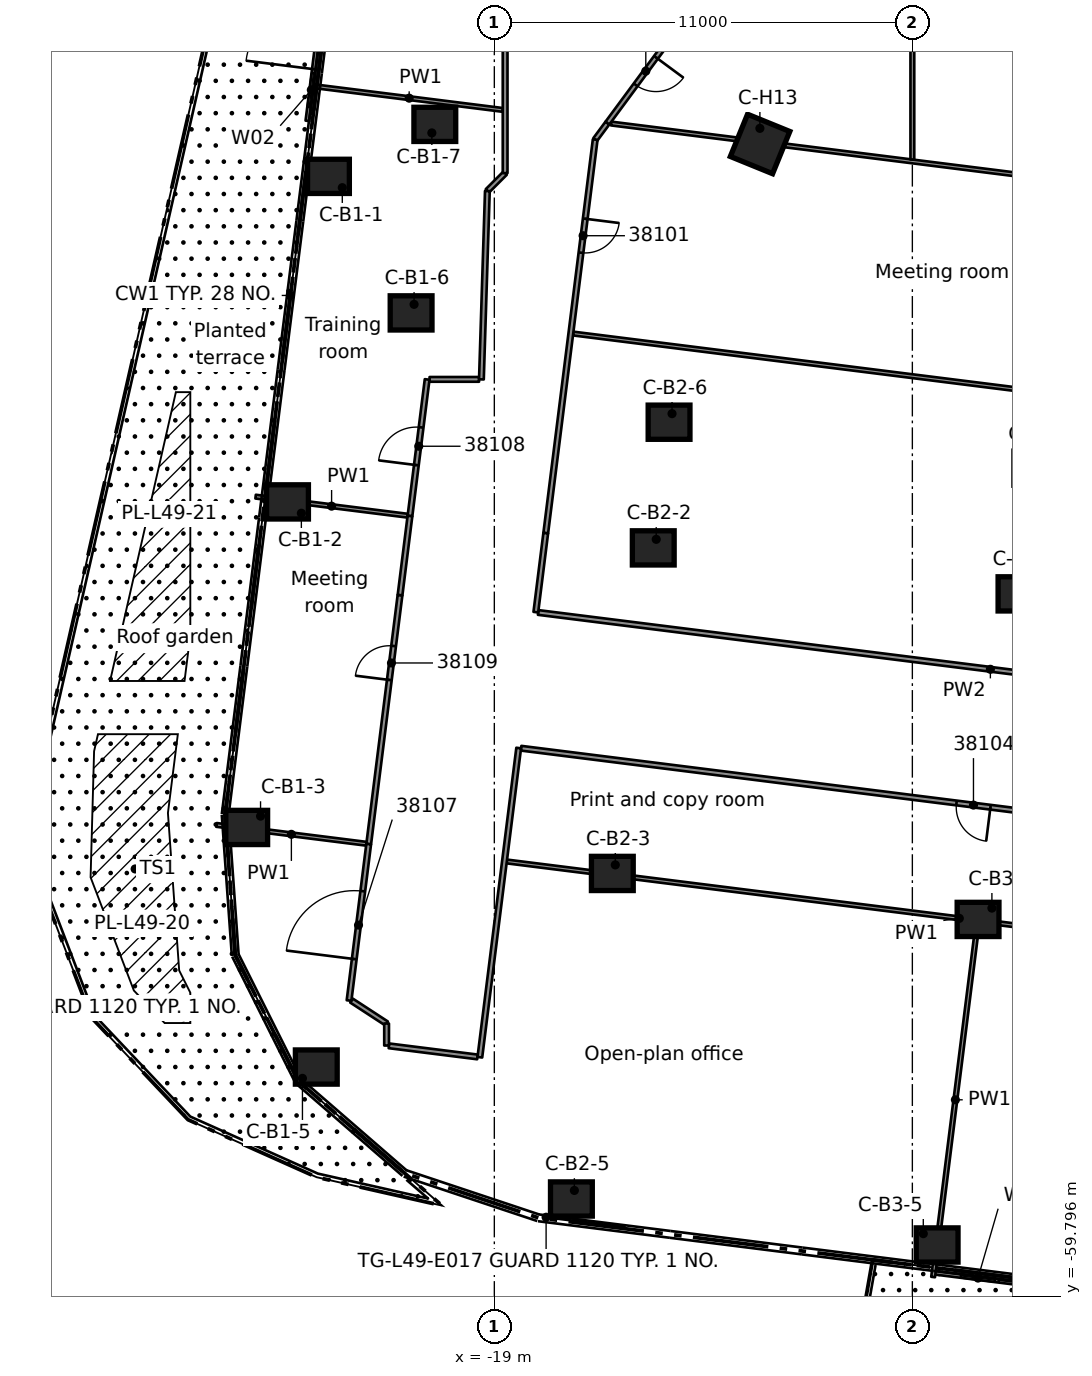
"""IFC4 building model, lengths in metres.
Left out: names, types, materials, properties, quantities, classifications, styles, units other than length and angle.
Written with IfcOpenShell. Run it as: python <this file> out.ifc"""

import sys

from ifc_helpers import new_model, si_unit, direction, frame, frame_2d, origin, origin_2d, place, context, subcontext, project, spatial, rectangle, extrude, element, fill, save


model = new_model("IFC4")
c1 = context("Model", 3, precision=1e-05, world=origin(), true_north=direction((0.0, 1.0)))
c2 = subcontext(c1, "Body", "Model", "MODEL_VIEW")
j1 = project(units=[si_unit("LENGTHUNIT", "METRE"), si_unit("PLANEANGLEUNIT", "RADIAN")], contexts=[c1])
p1 = place(None, origin())
s1 = spatial("IfcSite", under=j1, at=p1, CompositionType="ELEMENT")
p2 = place(p1, origin())
s2 = spatial("IfcBuilding", under=s1, at=p2, CompositionType="ELEMENT")
p3 = place(p2, frame((0.0, 0.0, 188.6)))
s3 = spatial("IfcBuildingStorey", under=s2, at=p3, CompositionType="ELEMENT", Elevation=188.6)
for number, where, z_axis, x_axis in (
    (1, (-23.365, -30.322, 0.0), (0.0, 0.0, 1.0), (1.0, 0.0, 0.0)),
    (2, (-24.442, -38.888, 0.0), (0.0, 0.0, 1.0), (1.0, 0.0, 0.0)),
    (3, (-25.516, -47.454, 0.0), (0.0, 0.0, 1.0), (1.0, 0.0, 0.0)),
    (4, (-23.685, -53.758, 0.0), (0.0, 0.0, 1.0), (1.0, 0.0, 0.0)),
    (5, (-21.19, -33.915, 0.0), (0.0, 0.0, 1.0), (1.0, 0.0, 0.0)),
    (6, (-20.566, -28.954, 0.0), (0.0, 0.0, 1.0), (1.0, 0.0, 0.0)),
    (7, (-14.818, -40.098, 0.0), (0.0, 0.0, 1.0), (1.0, 0.0, 0.0)),
    (8, (-15.895, -48.664, 0.0), (0.0, 0.0, 1.0), (1.0, 0.0, 0.0)),
    (9, (-16.972, -57.23, 0.0), (0.0, 0.0, 1.0), (1.0, 0.0, 0.0)),
    (10, (-14.402, -36.791, 0.0), (0.0, 0.0, 1.0), (1.0, 0.0, 0.0)),
    (11, (-5.194, -41.308, 0.0), (0.0, 0.0, 1.0), (1.0, 0.0, 0.0)),
    (12, (-6.271, -49.874, 0.0), (0.0, 0.0, 1.0), (1.0, 0.0, 0.0)),
    (13, (-7.348, -58.44, 0.0), (0.0, 0.0, 1.0), (1.0, 0.0, 0.0)),
):
    element("IfcColumn", number, at=place(p3, frame(where, z_axis=z_axis, x_axis=x_axis)), inside=s3, PredefinedType="COLUMN", context=c2, shape_type="SweptSolid", body=[
        extrude(rectangle(XDim=1.1, YDim=0.9, at=origin_2d()), origin(), (0.0, 0.0, 1.0), 3.5),
    ])
p4 = place(p3, frame((-12.007, -29.47, 0.0), z_axis=(0.0, 0.0, 1.0), x_axis=(-0.377323624231, -0.926081466501, 0.0)))
e14 = element("IfcColumn", 14, at=p4, inside=s3, PredefinedType="COLUMN", context=c2, shape_type="SweptSolid", body=[
    extrude(rectangle(XDim=1.2, YDim=1.2, at=origin_2d()), origin(), (0.0, 0.0, 1.0), 3.5),
])
p5 = place(p3, frame((-23.918, -28.862, 0.0), z_axis=(0.0, 0.0, 1.0), x_axis=(0.124796053311, 0.992182415223, 0.0)))
e15 = element("IfcWall", 15, at=p5, inside=s3, PredefinedType="STANDARD", context=c2, shape_type="SweptSolid", body=[
    extrude(rectangle(XDim=4.539, YDim=0.1, at=frame_2d((2.269, 0.0))), origin(), (0.0, 0.0, 1.0), 3.08),
])
p6 = place(p5, frame((1.37, 0.0, 0.0)))
e16 = element("IfcOpeningElement", 16, at=p6, cuts=e15, PredefinedType="OPENING", context=c2, shape_type="SweptSolid", body=[
    extrude(rectangle(XDim=1.8, YDim=2.4, at=frame_2d((0.9, 1.2))), frame((0.0, 0.06, 0.0), z_axis=(0.0, -1.0, 0.0), x_axis=(1.0, 0.0, 0.0)), (0.0, 0.0, 1.0), 0.12),
])
p7 = place(p5, frame((0.37, 0.0, 0.0)))
e17 = element("IfcOpeningElement", 17, at=p7, cuts=e15, PredefinedType="OPENING", context=c2, shape_type="SweptSolid", body=[
    extrude(rectangle(XDim=0.9, YDim=2.4, at=frame_2d((0.45, 1.2))), frame((0.0, 0.06, 0.0), z_axis=(0.0, -1.0, 0.0), x_axis=(1.0, 0.0, 0.0)), (0.0, 0.0, 1.0), 0.12),
])
p8 = place(p5, frame((3.27, 0.0, 0.0)))
e18 = element("IfcOpeningElement", 18, at=p8, cuts=e15, PredefinedType="OPENING", context=c2, shape_type="SweptSolid", body=[
    extrude(rectangle(XDim=0.9, YDim=2.4, at=frame_2d((0.45, 1.2))), frame((0.0, 0.06, 0.0), z_axis=(0.0, -1.0, 0.0), x_axis=(1.0, 0.0, 0.0)), (0.0, 0.0, 1.0), 0.12),
])
p9 = place(p3, frame((-2.255, -59.816, 0.0), z_axis=(0.0, 0.0, 1.0), x_axis=(-0.992182235567, 0.124797481646, 0.0)))
e19 = element("IfcWall", 19, at=p9, inside=s3, PredefinedType="STANDARD", context=c2, shape_type="SweptSolid", body=[
    extrude(rectangle(XDim=5.2, YDim=0.1, at=frame_2d((2.6, 0.0))), origin(), (0.0, 0.0, 1.0), 3.08),
])
p10 = place(p9, frame((1.7, 0.0, 0.0)))
e20 = element("IfcOpeningElement", 20, at=p10, cuts=e19, PredefinedType="OPENING", context=c2, shape_type="SweptSolid", body=[
    extrude(rectangle(XDim=1.8, YDim=2.4, at=frame_2d((0.9, 1.2))), frame((0.0, 0.06, 0.0), z_axis=(0.0, -1.0, 0.0), x_axis=(1.0, 0.0, 0.0)), (0.0, 0.0, 1.0), 0.12),
])
p11 = place(p9, frame((0.7, 0.0, 0.0)))
e21 = element("IfcOpeningElement", 21, at=p11, cuts=e19, PredefinedType="OPENING", context=c2, shape_type="SweptSolid", body=[
    extrude(rectangle(XDim=0.9, YDim=2.4, at=frame_2d((0.45, 1.2))), frame((0.0, 0.06, 0.0), z_axis=(0.0, -1.0, 0.0), x_axis=(1.0, 0.0, 0.0)), (0.0, 0.0, 1.0), 0.12),
])
p12 = place(p9, frame((3.6, 0.0, 0.0)))
e22 = element("IfcOpeningElement", 22, at=p12, cuts=e19, PredefinedType="OPENING", context=c2, shape_type="SweptSolid", body=[
    extrude(rectangle(XDim=0.9, YDim=2.4, at=frame_2d((0.45, 1.2))), frame((0.0, 0.06, 0.0), z_axis=(0.0, -1.0, 0.0), x_axis=(1.0, 0.0, 0.0)), (0.0, 0.0, 1.0), 0.12),
])
p13 = place(p3, frame((-21.773, -53.2, 0.0), z_axis=(0.0, 0.0, 1.0), x_axis=(0.992231399055, -0.124405991537, 0.0)))
e23 = element("IfcWall", 23, at=p13, inside=s3, PredefinedType="PARTITIONING", context=c2, shape_type="SweptSolid", body=[
    extrude(rectangle(XDim=2.347, YDim=0.125, at=frame_2d((1.174, 0.0))), origin(), (0.0, 0.0, 1.0), 3.06),
])
p14 = place(p3, frame((-26.313, -47.387, 0.0), z_axis=(0.0, 0.0, 1.0), x_axis=(0.992185976099, -0.124767739553, 0.0)))
e24 = element("IfcWall", 24, at=p14, inside=s3, PredefinedType="PARTITIONING", context=c2, shape_type="SweptSolid", body=[
    extrude(rectangle(XDim=3.976, YDim=0.1, at=frame_2d((1.988, 0.0))), origin(), (0.0, 0.0, 1.0), 3.06),
])
p15 = place(p3, frame((-18.671, -48.349, 0.0), z_axis=(0.0, 0.0, 1.0), x_axis=(0.992194081433, -0.124703266873, 0.0)))
e25 = element("IfcWall", 25, at=p15, inside=s3, PredefinedType="PARTITIONING", context=c2, shape_type="SweptSolid", body=[
    extrude(rectangle(XDim=24.0, YDim=0.1, at=frame_2d((12.0, 0.0))), origin(), (0.0, 0.0, 1.0), 3.06),
])
p16 = place(p3, frame((5.502, -48.361, 0.0), z_axis=(0.0, 0.0, 1.0), x_axis=(-0.992188044587, 0.124751289286, 0.0)))
e26 = element("IfcWall", 26, at=p16, inside=s3, PredefinedType="PARTITIONING", context=c2, shape_type="SweptSolid", body=[
    extrude(rectangle(XDim=23.985, YDim=0.125, at=frame_2d((11.993, 0.0))), origin(), (0.0, 0.0, 1.0), 3.06),
])
p17 = place(p16, frame((11.538, 0.0, 0.0)))
e27 = element("IfcOpeningElement", 27, at=p17, cuts=e26, PredefinedType="OPENING", context=c2, shape_type="SweptSolid", body=[
    extrude(rectangle(XDim=0.9, YDim=2.1, at=frame_2d((0.45, 1.05))), frame((0.0, 0.073, 0.0), z_axis=(0.0, -1.0, 0.0), x_axis=(1.0, 0.0, 0.0)), (0.0, 0.0, 1.0), 0.145),
])
p18 = place(p3, frame((-17.846, -41.797, 0.0), z_axis=(0.0, 0.0, 1.0), x_axis=(0.992194342851, -0.1247011869, 0.0)))
e28 = element("IfcWall", 28, at=p18, inside=s3, PredefinedType="PARTITIONING", context=c2, shape_type="SweptSolid", body=[
    extrude(rectangle(XDim=23.985, YDim=0.125, at=frame_2d((11.993, 0.0))), origin(), (0.0, 0.0, 1.0), 3.06),
])
p19 = place(p18, frame((13.788, 0.0, 0.0)))
e29 = element("IfcOpeningElement", 29, at=p19, cuts=e28, PredefinedType="OPENING", context=c2, shape_type="SweptSolid", body=[
    extrude(rectangle(XDim=1.8, YDim=2.1, at=frame_2d((0.9, 1.05))), frame((0.0, 0.073, 0.0), z_axis=(0.0, -1.0, 0.0), x_axis=(1.0, 0.0, 0.0)), (0.0, 0.0, 1.0), 0.145),
])
p20 = place(p3, frame((-25.282, -38.749, 0.0), z_axis=(0.0, 0.0, 1.0), x_axis=(0.992218133557, -0.124511748205, 0.0)))
e30 = element("IfcWall", 30, at=p20, inside=s3, PredefinedType="PARTITIONING", context=c2, shape_type="SweptSolid", body=[
    extrude(rectangle(XDim=4.031, YDim=0.1, at=frame_2d((2.016, 0.0))), origin(), (0.0, 0.0, 1.0), 3.06),
])
p21 = place(p3, frame((-16.924, -34.458, 0.0), z_axis=(0.0, 0.0, 1.0), x_axis=(0.992190096307, -0.124734970202, 0.0)))
e31 = element("IfcWall", 31, at=p21, inside=s3, PredefinedType="PARTITIONING", context=c2, shape_type="SweptSolid", body=[
    extrude(rectangle(XDim=23.986, YDim=0.1, at=frame_2d((11.993, 0.0))), origin(), (0.0, 0.0, 1.0), 3.06),
])
p22 = place(p3, frame((-23.703, -27.955, 0.0), z_axis=(0.0, 0.0, 1.0), x_axis=(0.992195935575, -0.124688513617, 0.0)))
e32 = element("IfcWall", 32, at=p22, inside=s3, PredefinedType="PARTITIONING", context=c2, shape_type="SweptSolid", body=[
    extrude(rectangle(XDim=4.964, YDim=0.1, at=frame_2d((2.482, 0.0))), origin(), (0.0, 0.0, 1.0), 3.06),
])
p23 = place(p3, frame((-15.925, -28.932, 0.0), z_axis=(0.0, 0.0, 1.0), x_axis=(0.992178923258, -0.124823812799, 0.0)))
e33 = element("IfcWall", 33, at=p23, inside=s3, PredefinedType="PARTITIONING", context=c2, shape_type="SweptSolid", body=[
    extrude(rectangle(XDim=23.57, YDim=0.1, at=frame_2d((11.785, 0.0))), origin(), (0.0, 0.0, 1.0), 3.06),
])
p24 = place(p3, frame((-22.759, -52.009, 0.0), z_axis=(0.0, 0.0, 1.0), x_axis=(0.837456505501, -0.546503981133, 0.0)))
e34 = element("IfcWall", 34, at=p24, inside=s3, PredefinedType="PARTITIONING", context=c2, shape_type="SweptSolid", body=[
    extrude(rectangle(XDim=1.104, YDim=0.125, at=frame_2d((0.552, 0.0))), origin(), (0.0, 0.0, 1.0), 3.06),
])
p25 = place(p3, frame((-20.704, -35.664, 0.0), z_axis=(0.0, 0.0, 1.0), x_axis=(1.0, 0.0, 0.0)))
e35 = element("IfcWall", 35, at=p25, inside=s3, PredefinedType="PARTITIONING", context=c2, shape_type="SweptSolid", body=[
    extrude(rectangle(XDim=1.302, YDim=0.125, at=frame_2d((0.651, 0.0))), origin(), (0.0, 0.0, 1.0), 3.06),
])
p26 = place(p3, frame((-19.182, -30.703, 0.0), z_axis=(0.0, 0.0, 1.0), x_axis=(0.707106781187, 0.707106781187, 0.0)))
e36 = element("IfcWall", 36, at=p26, inside=s3, PredefinedType="PARTITIONING", context=c2, shape_type="SweptSolid", body=[
    extrude(rectangle(XDim=0.659, YDim=0.125, at=frame_2d((0.329, 0.0))), origin(), (0.0, 0.0, 1.0), 3.06),
])
p27 = place(p3, frame((-16.345, -29.354, 0.0), z_axis=(0.0, 0.0, 1.0), x_axis=(0.594632608772, 0.803997550111, 0.0)))
e37 = element("IfcWall", 37, at=p27, inside=s3, PredefinedType="PARTITIONING", context=c2, shape_type="SweptSolid", body=[
    extrude(rectangle(XDim=0.54, YDim=0.125, at=frame_2d((0.27, 0.0))), origin(), (0.0, 0.0, 1.0), 3.06),
])
p28 = place(p3, frame((-14.093, -26.307, 0.0), z_axis=(0.0, 0.0, 1.0), x_axis=(-0.594298094146, -0.80424484785, 0.0)))
e38 = element("IfcWall", 38, at=p28, inside=s3, PredefinedType="PARTITIONING", context=c2, shape_type="SweptSolid", body=[
    extrude(rectangle(XDim=3.249, YDim=0.125, at=frame_2d((1.625, 0.0))), origin(), (0.0, 0.0, 1.0), 3.06),
])
p29 = place(p28, frame((1.1, 0.0, 0.0)))
e39 = element("IfcOpeningElement", 39, at=p29, cuts=e38, PredefinedType="OPENING", context=c2, shape_type="SweptSolid", body=[
    extrude(rectangle(XDim=0.9, YDim=2.1, at=frame_2d((0.45, 1.05))), frame((0.0, 0.073, 0.0), z_axis=(0.0, -1.0, 0.0), x_axis=(1.0, 0.0, 0.0)), (0.0, 0.0, 1.0), 0.145),
])
p30 = place(p3, frame((-19.183, -30.708, 0.0), z_axis=(0.0, 0.0, 1.0), x_axis=(-0.031658999126, -0.99949872825, 0.0)))
e40 = element("IfcWall", 40, at=p30, inside=s3, PredefinedType="PARTITIONING", context=c2, shape_type="SweptSolid", body=[
    extrude(rectangle(XDim=4.958, YDim=0.125, at=frame_2d((2.479, 0.0))), origin(), (0.0, 0.0, 1.0), 3.06),
])
p31 = place(p3, frame((-7.454, -59.283, 0.0), z_axis=(0.0, 0.0, 1.0), x_axis=(0.124805126351, 0.99218127398, 0.0)))
e41 = element("IfcWall", 41, at=p31, inside=s3, PredefinedType="PARTITIONING", context=c2, shape_type="SweptSolid", body=[
    extrude(rectangle(XDim=9.399, YDim=0.1, at=frame_2d((4.7, 0.0))), origin(), (0.0, 0.0, 1.0), 3.06),
])
p32 = place(p3, frame((-19.381, -53.5, 0.0), z_axis=(0.0, 0.0, 1.0), x_axis=(0.124661325918, 0.992199351854, 0.0)))
e42 = element("IfcWall", 42, at=p32, inside=s3, PredefinedType="PARTITIONING", context=c2, shape_type="SweptSolid", body=[
    extrude(rectangle(XDim=8.2, YDim=0.125, at=frame_2d((4.1, 0.0))), origin(), (0.0, 0.0, 1.0), 3.06),
])
p33 = place(p3, frame((-16.346, -29.355, 0.0), z_axis=(0.0, 0.0, 1.0), x_axis=(-0.124673942426, -0.992197766617, 0.0)))
e43 = element("IfcWall", 43, at=p33, inside=s3, PredefinedType="PARTITIONING", context=c2, shape_type="SweptSolid", body=[
    extrude(rectangle(XDim=10.435, YDim=0.125, at=frame_2d((5.218, 0.0))), origin(), (0.0, 0.0, 1.0), 3.06),
])
p34 = place(p33, frame((2.099, 0.0, 0.0)))
e44 = element("IfcOpeningElement", 44, at=p34, cuts=e43, PredefinedType="OPENING", context=c2, shape_type="SweptSolid", body=[
    extrude(rectangle(XDim=0.9, YDim=2.1, at=frame_2d((0.45, 1.05))), frame((0.0, 0.073, 0.0), z_axis=(0.0, -1.0, 0.0), x_axis=(1.0, 0.0, 0.0)), (0.0, 0.0, 1.0), 0.145),
])
p35 = place(p3, frame((-17.908, -41.789, 0.0), z_axis=(0.0, 0.0, 1.0), x_axis=(0.124493385896, 0.992220437639, 0.0)))
e45 = element("IfcWall", 45, at=p35, inside=s3, PredefinedType="PARTITIONING", context=c2, shape_type="SweptSolid", body=[
    extrude(rectangle(XDim=2.096, YDim=0.125, at=frame_2d((1.048, 0.0))), origin(), (0.0, 0.0, 1.0), 3.06),
])
p36 = place(p3, frame((-22.306, -47.891, 0.0), z_axis=(0.0, 0.0, 1.0), x_axis=(0.124831339058, 0.992177976368, 0.0)))
e46 = element("IfcWall", 46, at=p36, inside=s3, PredefinedType="PARTITIONING", context=c2, shape_type="SweptSolid", body=[
    extrude(rectangle(XDim=6.601, YDim=0.125, at=frame_2d((3.3, 0.0))), origin(), (0.0, 0.0, 1.0), 3.06),
])
p37 = place(p36, frame((4.353, 0.0, 0.0)))
e47 = element("IfcOpeningElement", 47, at=p37, cuts=e46, PredefinedType="OPENING", context=c2, shape_type="SweptSolid", body=[
    extrude(rectangle(XDim=0.9, YDim=2.1, at=frame_2d((0.45, 1.05))), frame((0.0, 0.073, 0.0), z_axis=(0.0, -1.0, 0.0), x_axis=(1.0, 0.0, 0.0)), (0.0, 0.0, 1.0), 0.145),
])
p38 = place(p3, frame((-21.22, -39.259, 0.0), z_axis=(0.0, 0.0, 1.0), x_axis=(0.12478977457, 0.992183204939, 0.0)))
e48 = element("IfcWall", 48, at=p38, inside=s3, PredefinedType="PARTITIONING", context=c2, shape_type="SweptSolid", body=[
    extrude(rectangle(XDim=3.621, YDim=0.125, at=frame_2d((1.811, 0.0))), origin(), (0.0, 0.0, 1.0), 3.06),
])
p39 = place(p38, frame((1.35, 0.0, 0.0)))
e49 = element("IfcOpeningElement", 49, at=p39, cuts=e48, PredefinedType="OPENING", context=c2, shape_type="SweptSolid", body=[
    extrude(rectangle(XDim=1.0, YDim=2.1, at=frame_2d((0.5, 1.05))), frame((0.0, 0.073, 0.0), z_axis=(0.0, -1.0, 0.0), x_axis=(1.0, 0.0, 0.0)), (0.0, 0.0, 1.0), 0.145),
])
p40 = place(p3, frame((-22.823, -52.008, 0.0), z_axis=(0.0, 0.0, 1.0), x_axis=(0.12462129386, 0.992204380718, 0.0)))
e50 = element("IfcWall", 50, at=p40, inside=s3, PredefinedType="PARTITIONING", context=c2, shape_type="SweptSolid", body=[
    extrude(rectangle(XDim=4.149, YDim=0.125, at=frame_2d((2.075, 0.0))), origin(), (0.0, 0.0, 1.0), 3.06),
])
p41 = place(p40, frame((1.1, 0.0, 0.0)))
e51 = element("IfcOpeningElement", 51, at=p41, cuts=e50, PredefinedType="OPENING", context=c2, shape_type="SweptSolid", body=[
    extrude(rectangle(XDim=1.8, YDim=2.1, at=frame_2d((0.9, 1.05))), frame((0.0, 0.073, 0.0), z_axis=(0.0, -1.0, 0.0), x_axis=(1.0, 0.0, 0.0)), (0.0, 0.0, 1.0), 0.145),
])
p42 = place(p3, frame((-21.481, -41.34, 0.0), z_axis=(0.0, 0.0, 1.0), x_axis=(0.124435870528, 0.992227652369, 0.0)))
e52 = element("IfcWall", 52, at=p42, inside=s3, PredefinedType="PARTITIONING", context=c2, shape_type="SweptSolid", body=[
    extrude(rectangle(XDim=2.097, YDim=0.125, at=frame_2d((1.049, 0.0))), origin(), (0.0, 0.0, 1.0), 3.06),
])
p43 = place(p3, frame((-8.0, -29.879, 0.0), z_axis=(0.0, 0.0, 1.0), x_axis=(0.0, 1.0, 0.0)))
e53 = element("IfcWall", 53, at=p43, inside=s3, PredefinedType="PARTITIONING", context=c2, shape_type="SweptSolid", body=[
    extrude(rectangle(XDim=15.416, YDim=0.1, at=frame_2d((7.708, 0.0))), origin(), (0.0, 0.0, 1.0), 3.06),
])
p44 = place(p3, frame((-18.716, -30.237, 0.0), z_axis=(0.0, 0.0, 1.0), x_axis=(0.0, 1.0, 0.0)))
e54 = element("IfcWall", 54, at=p44, inside=s3, PredefinedType="PARTITIONING", context=c2, shape_type="SweptSolid", body=[
    extrude(rectangle(XDim=3.678, YDim=0.125, at=frame_2d((1.839, 0.0))), origin(), (0.0, 0.0, 1.0), 3.06),
])
p45 = place(p3, frame((-21.835, -53.192, 0.0), z_axis=(0.0, 0.0, 1.0), x_axis=(0.0, 1.0, 0.0)))
e55 = element("IfcWall", 55, at=p45, inside=s3, PredefinedType="PARTITIONING", context=c2, shape_type="SweptSolid", body=[
    extrude(rectangle(XDim=0.58, YDim=0.125, at=frame_2d((0.29, 0.0))), origin(), (0.0, 0.0, 1.0), 3.06),
])
p46 = place(p6, origin())
e56 = element("IfcDoor", 56, at=p46, inside=s3, OperationType="DOUBLE_DOOR_SINGLE_SWING", PredefinedType="DOOR", context=c2, shape_type="SweptSolid", body=[
    extrude(rectangle(XDim=1.8, YDim=2.4, at=frame_2d((0.9, 1.2))), frame((0.0, 0.025, 0.0), z_axis=(0.0, -1.0, 0.0), x_axis=(1.0, 0.0, 0.0)), (0.0, 0.0, 1.0), 0.05),
])
fill(e16, e56)
p47 = place(p7, origin())
e57 = element("IfcWindow", 57, at=p47, inside=s3, PartitioningType="SINGLE_PANEL", PredefinedType="WINDOW", context=c2, shape_type="SweptSolid", body=[
    extrude(rectangle(XDim=0.9, YDim=2.4, at=frame_2d((0.45, 1.2))), frame((0.0, 0.03, 0.0), z_axis=(0.0, -1.0, 0.0), x_axis=(1.0, 0.0, 0.0)), (0.0, 0.0, 1.0), 0.06),
])
fill(e17, e57)
p48 = place(p10, origin())
e58 = element("IfcDoor", 58, at=p48, inside=s3, OperationType="DOUBLE_DOOR_SLIDING", PredefinedType="DOOR", context=c2, shape_type="SweptSolid", body=[
    extrude(rectangle(XDim=1.8, YDim=2.4, at=frame_2d((0.9, 1.2))), frame((0.0, 0.025, 0.0), z_axis=(0.0, -1.0, 0.0), x_axis=(1.0, 0.0, 0.0)), (0.0, 0.0, 1.0), 0.05),
])
fill(e20, e58)
p49 = place(p12, origin())
e59 = element("IfcWindow", 59, at=p49, inside=s3, PartitioningType="SINGLE_PANEL", PredefinedType="WINDOW", context=c2, shape_type="SweptSolid", body=[
    extrude(rectangle(XDim=0.9, YDim=2.4, at=frame_2d((0.45, 1.2))), frame((0.0, 0.03, 0.0), z_axis=(0.0, -1.0, 0.0), x_axis=(1.0, 0.0, 0.0)), (0.0, 0.0, 1.0), 0.06),
])
fill(e22, e59)
p50 = place(p34, origin())
e60 = element("IfcDoor", 60, at=p50, inside=s3, OperationType="SINGLE_SWING_LEFT", PredefinedType="DOOR", context=c2, shape_type="SweptSolid", body=[
    extrude(rectangle(XDim=0.9, YDim=2.1, at=frame_2d((0.45, 1.05))), frame((0.0, 0.025, 0.0), z_axis=(0.0, -1.0, 0.0), x_axis=(1.0, 0.0, 0.0)), (0.0, 0.0, 1.0), 0.05),
])
fill(e44, e60)
p51 = place(p17, origin())
e61 = element("IfcDoor", 61, at=p51, inside=s3, OperationType="SINGLE_SWING_LEFT", PredefinedType="DOOR", context=c2, shape_type="SweptSolid", body=[
    extrude(rectangle(XDim=0.9, YDim=2.1, at=frame_2d((0.45, 1.05))), frame((0.0, 0.025, 0.0), z_axis=(0.0, -1.0, 0.0), x_axis=(1.0, 0.0, 0.0)), (0.0, 0.0, 1.0), 0.05),
])
fill(e27, e61)
p52 = place(p41, origin())
e62 = element("IfcDoor", 62, at=p52, inside=s3, OperationType="DOUBLE_DOOR_SINGLE_SWING", PredefinedType="DOOR", context=c2, shape_type="SweptSolid", body=[
    extrude(rectangle(XDim=1.8, YDim=2.1, at=frame_2d((0.9, 1.05))), frame((0.0, 0.025, 0.0), z_axis=(0.0, -1.0, 0.0), x_axis=(1.0, 0.0, 0.0)), (0.0, 0.0, 1.0), 0.05),
])
fill(e51, e62)
p53 = place(p39, origin())
e63 = element("IfcDoor", 63, at=p53, inside=s3, OperationType="SINGLE_SWING_RIGHT", PredefinedType="DOOR", context=c2, shape_type="SweptSolid", body=[
    extrude(rectangle(XDim=1.0, YDim=2.1, at=frame_2d((0.5, 1.05))), frame((0.0, 0.025, 0.0), z_axis=(0.0, -1.0, 0.0), x_axis=(1.0, 0.0, 0.0)), (0.0, 0.0, 1.0), 0.05),
])
fill(e49, e63)
p54 = place(p37, origin())
e64 = element("IfcDoor", 64, at=p54, inside=s3, OperationType="SINGLE_SWING_RIGHT", PredefinedType="DOOR", context=c2, shape_type="SweptSolid", body=[
    extrude(rectangle(XDim=0.9, YDim=2.1, at=frame_2d((0.45, 1.05))), frame((0.0, 0.025, 0.0), z_axis=(0.0, -1.0, 0.0), x_axis=(1.0, 0.0, 0.0)), (0.0, 0.0, 1.0), 0.05),
])
fill(e47, e64)
p55 = place(p29, origin())
e65 = element("IfcDoor", 65, at=p55, inside=s3, OperationType="SINGLE_SWING_LEFT", PredefinedType="DOOR", context=c2, shape_type="SweptSolid", body=[
    extrude(rectangle(XDim=0.9, YDim=2.1, at=frame_2d((0.45, 1.05))), frame((0.0, 0.025, 0.0), z_axis=(0.0, -1.0, 0.0), x_axis=(1.0, 0.0, 0.0)), (0.0, 0.0, 1.0), 0.05),
])
fill(e39, e65)
save(model, sys.argv[1])
